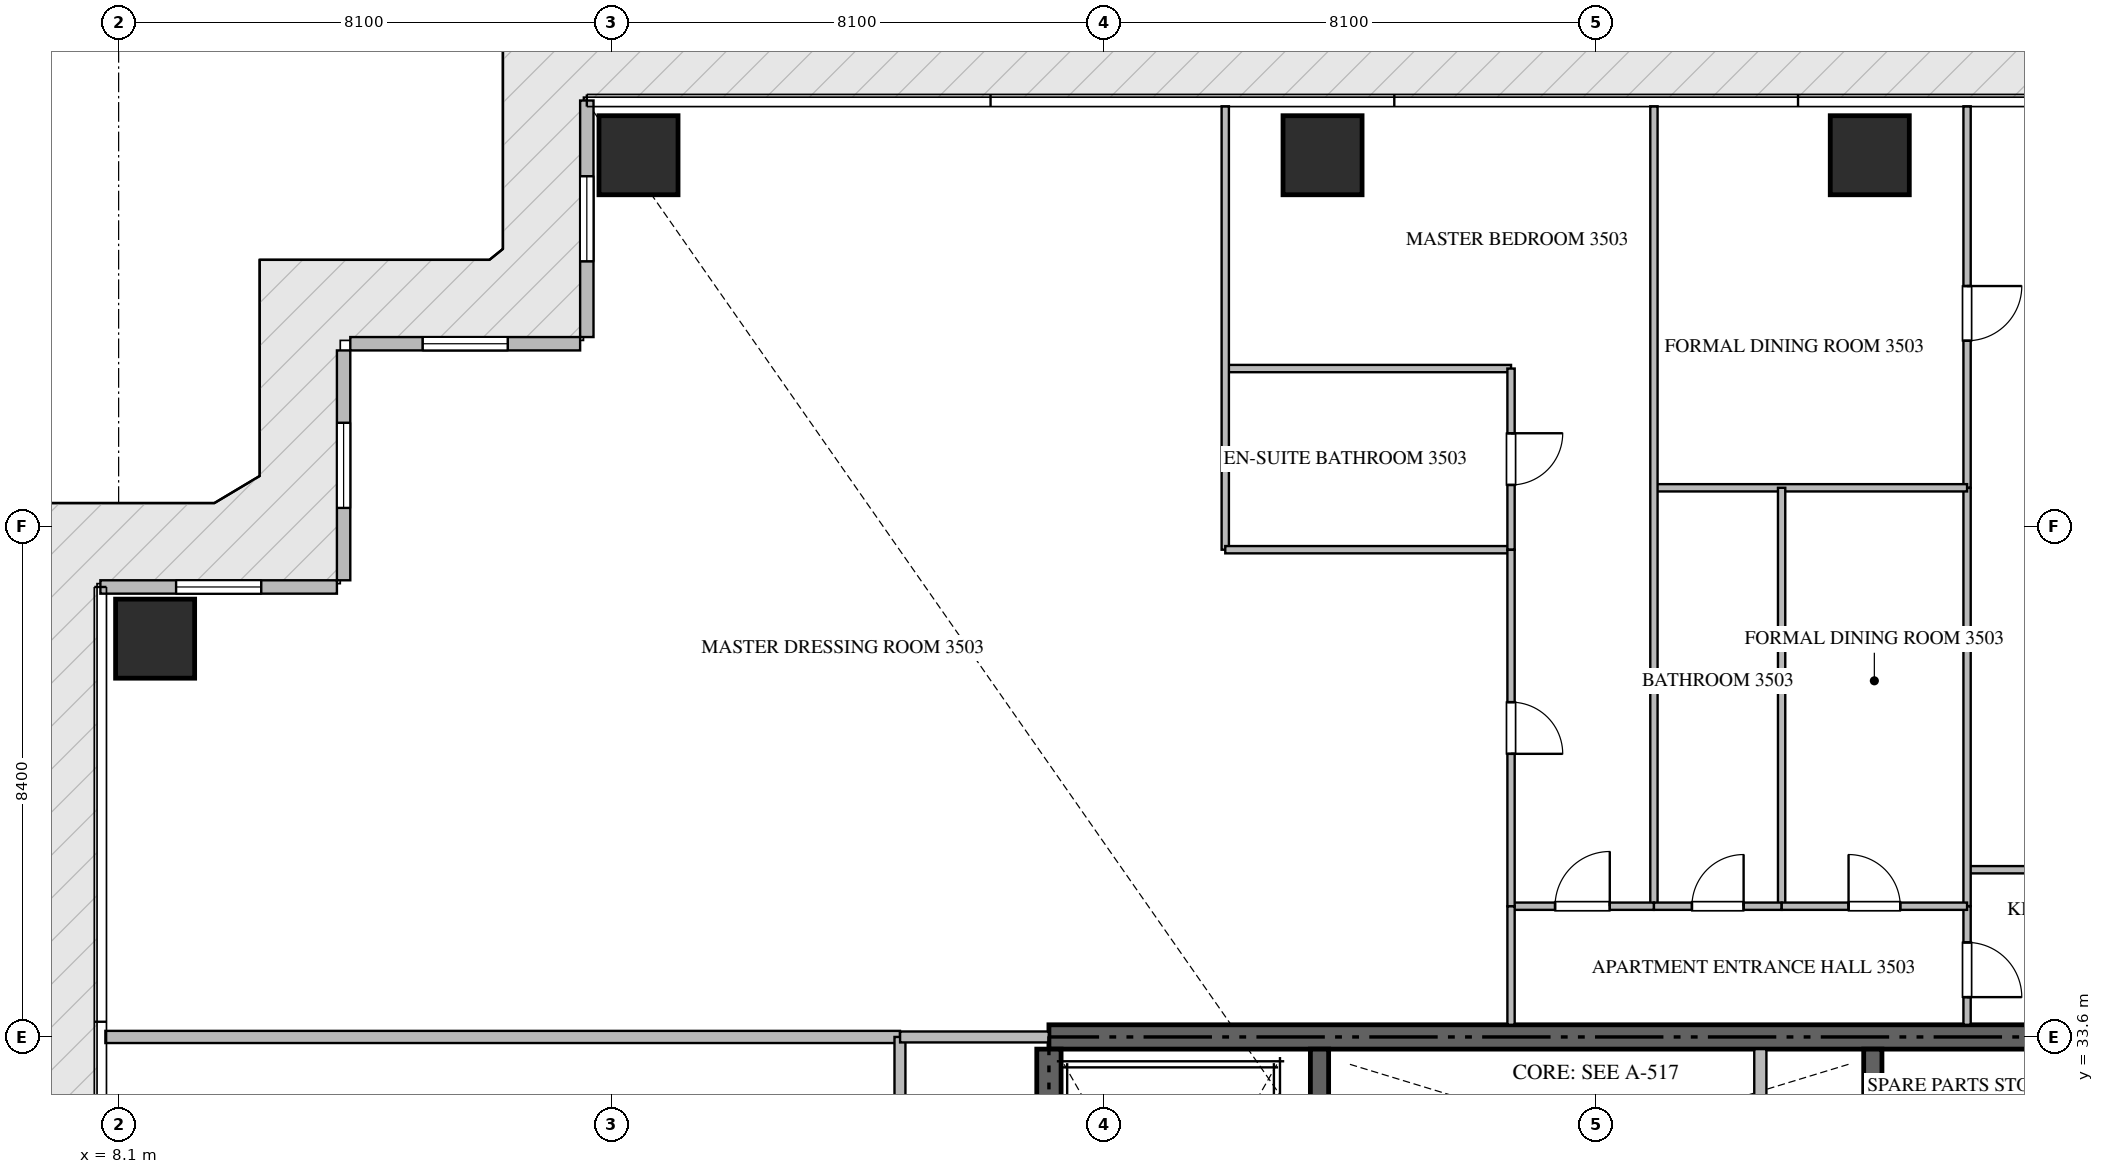
"""IFC4 building model, lengths in metres.
Left out: names, types, materials, properties, quantities, classifications, styles, units other than length and angle.
Written with IfcOpenShell. Run it as: python <this file> out.ifc"""

import sys

from ifc_helpers import new_model, si_unit, direction, frame, frame_2d, origin, origin_2d, place, context, subcontext, project, spatial, rectangle, extrude, source, transform, mapped, element, fill, save


model = new_model("IFC4")
c1 = context("Model", 3, precision=1e-05, world=origin(), true_north=direction((0.0, 1.0)))
c2 = subcontext(c1, "Body", "Model", "MODEL_VIEW")
j1 = project(units=[si_unit("LENGTHUNIT", "METRE"), si_unit("PLANEANGLEUNIT", "RADIAN")], contexts=[c1])
p1 = place(None, origin())
s1 = spatial("IfcSite", under=j1, at=p1, CompositionType="ELEMENT")
p2 = place(p1, origin())
s2 = spatial("IfcBuilding", under=s1, at=p2, CompositionType="ELEMENT")
p3 = place(p2, frame((0.0, 0.0, 142.65)))
s3 = spatial("IfcBuildingStorey", under=s2, at=p3, CompositionType="ELEMENT", Elevation=142.65)
p4 = place(p3, frame((41.4, 33.6, -0.26), z_axis=(0.0, 0.0, 1.0), x_axis=(-1.0, 0.0, 0.0)))
e1 = element("IfcWall", 1, at=p4, inside=s3, PredefinedType="SHEAR", context=c2, shape_type="SweptSolid", body=[
    extrude(rectangle(XDim=18.0, YDim=0.4, at=frame_2d((9.0, 0.0))), origin(), (0.0, 0.0, 1.0), 3.748),
])
p5 = place(p3, frame((23.4, 24.25, -0.26), z_axis=(0.0, 0.0, 1.0), x_axis=(0.0, 1.0, 0.0)))
e2 = element("IfcWall", 2, at=p5, inside=s3, PredefinedType="SHEAR", context=c2, shape_type="SweptSolid", body=[
    extrude(rectangle(XDim=9.15, YDim=0.4, at=frame_2d((4.575, 0.0))), origin(), (0.0, 0.0, 1.0), 3.748),
])
p6 = place(p3, frame((27.85, 23.55, -0.26), z_axis=(0.0, 0.0, 1.0), x_axis=(0.0, 1.0, 0.0)))
e3 = element("IfcWall", 3, at=p6, inside=s3, PredefinedType="SHEAR", context=c2, shape_type="SweptSolid", body=[
    extrude(rectangle(XDim=9.85, YDim=0.3, at=frame_2d((4.925, 0.0))), origin(), (0.0, 0.0, 1.0), 3.748),
])
p7 = place(p3, frame((36.95, 27.05, -0.26), z_axis=(0.0, 0.0, 1.0), x_axis=(0.0, 1.0, 0.0)))
e4 = element("IfcWall", 4, at=p7, inside=s3, PredefinedType="SHEAR", context=c2, shape_type="SweptSolid", body=[
    extrude(rectangle(XDim=6.35, YDim=0.3, at=frame_2d((3.175, 0.0))), origin(), (0.0, 0.0, 1.0), 3.748),
])
m1 = source(origin(), c2, "Body", "SweptSolid", [
    extrude(rectangle(XDim=1.3, YDim=1.3, at=origin_2d()), origin(), (0.0, 0.0, 1.0), 3.75),
])
for number, where, z_axis, x_axis in (
    (5, (16.65, 48.1, -0.26), (0.0, 0.0, 1.0), (1.0, 0.0, 0.0)),
    (6, (27.9, 48.1, -0.26), (0.0, 0.0, 1.0), (1.0, 0.0, 0.0)),
    (7, (36.9, 48.1, -0.26), (0.0, 0.0, 1.0), (1.0, 0.0, 0.0)),
    (8, (8.7, 40.15, -0.26), (0.0, 0.0, 1.0), (1.0, 0.0, 0.0)),
):
    element("IfcColumn", number, at=place(p3, frame(where, z_axis=z_axis, x_axis=x_axis)), inside=s3, PredefinedType="COLUMN", context=c2, shape_type="MappedRepresentation", body=[
        mapped(m1, transform((0.0, 0.0, 0.0), scale=1.0)),
    ])
p8 = place(p3, frame((15.8, 49.0, 0.0), z_axis=(0.0, 0.0, 1.0), x_axis=(0.0, -1.0, 0.0)))
e9 = element("IfcWall", 9, at=p8, inside=s3, PredefinedType="ELEMENTEDWALL", context=c2, shape_type="SweptSolid", body=[
    extrude(rectangle(XDim=3.89, YDim=0.22, at=frame_2d((1.945, 0.0))), origin(), (0.0, 0.0, 1.0), 3.475),
])
p9 = place(p8, frame((1.245, 0.0, 0.65)))
e10 = element("IfcOpeningElement", 10, at=p9, cuts=e9, PredefinedType="OPENING", context=c2, shape_type="SweptSolid", body=[
    extrude(rectangle(XDim=1.4, YDim=2.05, at=frame_2d((0.7, 1.025))), frame((0.0, 0.12, 0.0), z_axis=(0.0, -1.0, 0.0), x_axis=(1.0, 0.0, 0.0)), (0.0, 0.0, 1.0), 0.24),
])
p10 = place(p3, frame((15.69, 45.0, 0.0), z_axis=(0.0, 0.0, 1.0), x_axis=(-1.0, 0.0, 0.0)))
e11 = element("IfcWall", 11, at=p10, inside=s3, PredefinedType="ELEMENTEDWALL", context=c2, shape_type="SweptSolid", body=[
    extrude(rectangle(XDim=3.78, YDim=0.22, at=frame_2d((1.89, 0.0))), origin(), (0.0, 0.0, 1.0), 3.475),
])
p11 = place(p10, frame((1.19, 0.0, 0.65)))
e12 = element("IfcOpeningElement", 12, at=p11, cuts=e11, PredefinedType="OPENING", context=c2, shape_type="SweptSolid", body=[
    extrude(rectangle(XDim=1.4, YDim=2.05, at=frame_2d((0.7, 1.025))), frame((0.0, 0.12, 0.0), z_axis=(0.0, -1.0, 0.0), x_axis=(1.0, 0.0, 0.0)), (0.0, 0.0, 1.0), 0.24),
])
p12 = place(p3, frame((11.8, 44.89, 0.0), z_axis=(0.0, 0.0, 1.0), x_axis=(0.0, -1.0, 0.0)))
e13 = element("IfcWall", 13, at=p12, inside=s3, PredefinedType="ELEMENTEDWALL", context=c2, shape_type="SweptSolid", body=[
    extrude(rectangle(XDim=3.78, YDim=0.22, at=frame_2d((1.89, 0.0))), origin(), (0.0, 0.0, 1.0), 3.475),
])
p13 = place(p12, frame((1.19, 0.0, 0.65)))
e14 = element("IfcOpeningElement", 14, at=p13, cuts=e13, PredefinedType="OPENING", context=c2, shape_type="SweptSolid", body=[
    extrude(rectangle(XDim=1.4, YDim=2.05, at=frame_2d((0.7, 1.025))), frame((0.0, 0.12, 0.0), z_axis=(0.0, -1.0, 0.0), x_axis=(1.0, 0.0, 0.0)), (0.0, 0.0, 1.0), 0.24),
])
p14 = place(p3, frame((11.69, 41.0, 0.0), z_axis=(0.0, 0.0, 1.0), x_axis=(-1.0, 0.0, 0.0)))
e15 = element("IfcWall", 15, at=p14, inside=s3, PredefinedType="ELEMENTEDWALL", context=c2, shape_type="SweptSolid", body=[
    extrude(rectangle(XDim=3.89, YDim=0.22, at=frame_2d((1.945, 0.0))), origin(), (0.0, 0.0, 1.0), 3.475),
])
p15 = place(p14, frame((1.245, 0.0, 0.65)))
e16 = element("IfcOpeningElement", 16, at=p15, cuts=e15, PredefinedType="OPENING", context=c2, shape_type="SweptSolid", body=[
    extrude(rectangle(XDim=1.4, YDim=2.05, at=frame_2d((0.7, 1.025))), frame((0.0, 0.12, 0.0), z_axis=(0.0, -1.0, 0.0), x_axis=(1.0, 0.0, 0.0)), (0.0, 0.0, 1.0), 0.24),
])
p16 = place(p3, frame((35.1, 30.75, 0.0), z_axis=(0.0, 0.0, 1.0), x_axis=(0.0, 1.0, 0.0)))
e17 = element("IfcWall", 17, at=p16, inside=s3, PredefinedType="STANDARD", context=c2, shape_type="SweptSolid", body=[
    extrude(rectangle(XDim=2.65, YDim=0.2, at=frame_2d((1.325, 0.0))), origin(), (0.0, 0.0, 1.0), 3.49),
])
p17 = place(p3, frame((7.882, 33.6, 0.0), z_axis=(0.0, 0.0, 1.0), x_axis=(1.0, 0.0, 0.0)))
e18 = element("IfcWall", 18, at=p17, inside=s3, PredefinedType="PARTITIONING", context=c2, shape_type="SweptSolid", body=[
    extrude(rectangle(XDim=13.068, YDim=0.2, at=frame_2d((6.534, 0.0))), origin(), (0.0, 0.0, 1.0), 3.49),
])
p18 = place(p3, frame((20.95, 14.9, 0.0), z_axis=(0.0, 0.0, 1.0), x_axis=(0.0, 1.0, 0.0)))
e19 = element("IfcWall", 19, at=p18, inside=s3, PredefinedType="PARTITIONING", context=c2, shape_type="SweptSolid", body=[
    extrude(rectangle(XDim=18.7, YDim=0.18, at=frame_2d((9.35, 0.0))), origin(), (0.0, 0.0, 1.0), 3.49),
])
p19 = place(p18, frame((5.328, 0.0, 0.0)))
e20 = element("IfcOpeningElement", 20, at=p19, cuts=e19, PredefinedType="OPENING", context=c2, shape_type="SweptSolid", body=[
    extrude(rectangle(XDim=1.0, YDim=2.15, at=frame_2d((0.5, 1.075))), frame((0.0, 0.1, 0.0), z_axis=(0.0, -1.0, 0.0), x_axis=(1.0, 0.0, 0.0)), (0.0, 0.0, 1.0), 0.2),
])
p20 = place(p18, frame((15.257, 0.0, 0.0)))
e21 = element("IfcOpeningElement", 21, at=p20, cuts=e19, PredefinedType="OPENING", context=c2, shape_type="SweptSolid", body=[
    extrude(rectangle(XDim=1.0, YDim=2.15, at=frame_2d((0.5, 1.075))), frame((0.0, 0.1, 0.0), z_axis=(0.0, -1.0, 0.0), x_axis=(1.0, 0.0, 0.0)), (0.0, 0.0, 1.0), 0.2),
])
p21 = place(p3, frame((20.952, 33.6, 0.0), z_axis=(0.0, 0.0, 1.0), x_axis=(1.0, 0.0, 0.0)))
e22 = element("IfcWall", 22, at=p21, inside=s3, PredefinedType="PARTITIONING", context=c2, shape_type="SweptSolid", body=[
    extrude(rectangle(XDim=2.446, YDim=0.18, at=frame_2d((1.223, 0.0))), origin(), (0.0, 0.0, 1.0), 3.49),
])
p22 = place(p3, frame((38.5, 36.35, 0.0), z_axis=(0.0, 0.0, 1.0), x_axis=(1.0, 0.0, 0.0)))
e23 = element("IfcWall", 23, at=p22, inside=s3, PredefinedType="PARTITIONING", context=c2, shape_type="SweptSolid", body=[
    extrude(rectangle(XDim=2.85, YDim=0.12, at=frame_2d((1.425, 0.0))), origin(), (0.0, 0.0, 1.0), 3.49),
])
p23 = place(p22, frame((1.0, 0.0, 0.0)))
e24 = element("IfcOpeningElement", 24, at=p23, cuts=e23, PredefinedType="OPENING", context=c2, shape_type="SweptSolid", body=[
    extrude(rectangle(XDim=0.85, YDim=2.1, at=frame_2d((0.425, 1.05))), frame((0.0, 0.07, 0.0), z_axis=(0.0, -1.0, 0.0), x_axis=(1.0, 0.0, 0.0)), (0.0, 0.0, 1.0), 0.14),
])
p24 = place(p3, frame((38.5, 35.75, 0.0), z_axis=(0.0, 0.0, 1.0), x_axis=(0.0, -1.0, 0.0)))
e25 = element("IfcWall", 25, at=p24, inside=s3, PredefinedType="PARTITIONING", context=c2, shape_type="SweptSolid", body=[
    extrude(rectangle(XDim=1.95, YDim=0.12, at=frame_2d((0.975, 0.0))), origin(), (0.0, 0.0, 1.0), 3.49),
])
p25 = place(p24, frame((0.595, 0.0, 0.0)))
e26 = element("IfcOpeningElement", 26, at=p25, cuts=e25, PredefinedType="OPENING", context=c2, shape_type="SweptSolid", body=[
    extrude(rectangle(XDim=0.9, YDim=2.1, at=frame_2d((0.45, 1.05))), frame((0.0, 0.07, 0.0), z_axis=(0.0, -1.0, 0.0), x_axis=(1.0, 0.0, 0.0)), (0.0, 0.0, 1.0), 0.14),
])
p26 = place(p3, frame((38.5, 48.905, 0.0), z_axis=(0.0, 0.0, 1.0), x_axis=(0.0, -1.0, 0.0)))
e27 = element("IfcWall", 27, at=p26, inside=s3, PredefinedType="PARTITIONING", context=c2, shape_type="SweptSolid", body=[
    extrude(rectangle(XDim=6.274, YDim=0.12, at=frame_2d((3.137, 0.0))), origin(), (0.0, 0.0, 1.0), 3.49),
])
p27 = place(p26, frame((2.956, 0.0, 0.0)))
e28 = element("IfcOpeningElement", 28, at=p27, cuts=e27, PredefinedType="OPENING", context=c2, shape_type="SweptSolid", body=[
    extrude(rectangle(XDim=0.9, YDim=2.1, at=frame_2d((0.45, 1.05))), frame((0.0, 0.07, 0.0), z_axis=(0.0, -1.0, 0.0), x_axis=(1.0, 0.0, 0.0)), (0.0, 0.0, 1.0), 0.14),
])
p28 = place(p3, frame((38.5, 42.629, 0.0), z_axis=(0.0, 0.0, 1.0), x_axis=(0.0, -1.0, 0.0)))
e29 = element("IfcWall", 29, at=p28, inside=s3, PredefinedType="PARTITIONING", context=c2, shape_type="SweptSolid", body=[
    extrude(rectangle(XDim=6.877, YDim=0.12, at=frame_2d((3.438, 0.0))), origin(), (0.0, 0.0, 1.0), 3.49),
])
p29 = place(p3, frame((33.35, 42.631, 0.0), z_axis=(0.0, 0.0, 1.0), x_axis=(1.0, 0.0, 0.0)))
e30 = element("IfcWall", 30, at=p29, inside=s3, PredefinedType="PARTITIONING", context=c2, shape_type="SweptSolid", body=[
    extrude(rectangle(XDim=5.15, YDim=0.12, at=frame_2d((2.575, 0.0))), origin(), (0.0, 0.0, 1.0), 3.49),
])
p30 = place(p3, frame((33.35, 48.905, 0.0), z_axis=(0.0, 0.0, 1.0), x_axis=(0.0, -1.0, 0.0)))
e31 = element("IfcWall", 31, at=p30, inside=s3, PredefinedType="PARTITIONING", context=c2, shape_type="SweptSolid", body=[
    extrude(rectangle(XDim=13.155, YDim=0.12, at=frame_2d((6.578, 0.0))), origin(), (0.0, 0.0, 1.0), 3.49),
])
p31 = place(p3, frame((35.45, 42.631, 0.0), z_axis=(0.0, 0.0, 1.0), x_axis=(0.0, -1.0, 0.0)))
e32 = element("IfcWall", 32, at=p31, inside=s3, PredefinedType="PARTITIONING", context=c2, shape_type="SweptSolid", body=[
    extrude(rectangle(XDim=6.881, YDim=0.12, at=frame_2d((3.44, 0.0))), origin(), (0.0, 0.0, 1.0), 3.49),
])
p32 = place(p3, frame((33.35, 35.75, 0.0), z_axis=(0.0, 0.0, 1.0), x_axis=(1.0, 0.0, 0.0)))
e33 = element("IfcWall", 33, at=p32, inside=s3, PredefinedType="PARTITIONING", context=c2, shape_type="SweptSolid", body=[
    extrude(rectangle(XDim=2.1, YDim=0.12, at=frame_2d((1.05, 0.0))), origin(), (0.0, 0.0, 1.0), 3.49),
])
p33 = place(p32, frame((0.625, 0.0, 0.0)))
e34 = element("IfcOpeningElement", 34, at=p33, cuts=e33, PredefinedType="OPENING", context=c2, shape_type="SweptSolid", body=[
    extrude(rectangle(XDim=0.85, YDim=2.1, at=frame_2d((0.425, 1.05))), frame((0.0, 0.07, 0.0), z_axis=(0.0, -1.0, 0.0), x_axis=(1.0, 0.0, 0.0)), (0.0, 0.0, 1.0), 0.14),
])
p34 = place(p3, frame((35.452, 35.75, 0.0), z_axis=(0.0, 0.0, 1.0), x_axis=(1.0, 0.0, 0.0)))
e35 = element("IfcWall", 35, at=p34, inside=s3, PredefinedType="PARTITIONING", context=c2, shape_type="SweptSolid", body=[
    extrude(rectangle(XDim=3.048, YDim=0.12, at=frame_2d((1.524, 0.0))), origin(), (0.0, 0.0, 1.0), 3.49),
])
p35 = place(p34, frame((1.099, 0.0, 0.0)))
e36 = element("IfcOpeningElement", 36, at=p35, cuts=e35, PredefinedType="OPENING", context=c2, shape_type="SweptSolid", body=[
    extrude(rectangle(XDim=0.85, YDim=2.1, at=frame_2d((0.425, 1.05))), frame((0.0, 0.07, 0.0), z_axis=(0.0, -1.0, 0.0), x_axis=(1.0, 0.0, 0.0)), (0.0, 0.0, 1.0), 0.14),
])
p36 = place(p3, frame((31.0, 35.75, 0.0), z_axis=(0.0, 0.0, 1.0), x_axis=(1.0, 0.0, 0.0)))
e37 = element("IfcWall", 37, at=p36, inside=s3, PredefinedType="PARTITIONING", context=c2, shape_type="SweptSolid", body=[
    extrude(rectangle(XDim=2.348, YDim=0.12, at=frame_2d((1.174, 0.0))), origin(), (0.0, 0.0, 1.0), 3.49),
])
p37 = place(p36, frame((0.724, 0.0, 0.0)))
e38 = element("IfcOpeningElement", 38, at=p37, cuts=e37, PredefinedType="OPENING", context=c2, shape_type="SweptSolid", body=[
    extrude(rectangle(XDim=0.9, YDim=2.1, at=frame_2d((0.45, 1.05))), frame((0.0, 0.07, 0.0), z_axis=(0.0, -1.0, 0.0), x_axis=(1.0, 0.0, 0.0)), (0.0, 0.0, 1.0), 0.14),
])
p38 = place(p3, frame((26.3, 44.592, 0.0), z_axis=(0.0, 0.0, 1.0), x_axis=(1.0, 0.0, 0.0)))
e39 = element("IfcWall", 39, at=p38, inside=s3, PredefinedType="PARTITIONING", context=c2, shape_type="SweptSolid", body=[
    extrude(rectangle(XDim=4.7, YDim=0.12, at=frame_2d((2.35, 0.0))), origin(), (0.0, 0.0, 1.0), 3.49),
])
p39 = place(p3, frame((26.3, 48.905, 0.0), z_axis=(0.0, 0.0, 1.0), x_axis=(0.0, -1.0, 0.0)))
e40 = element("IfcWall", 40, at=p39, inside=s3, PredefinedType="PARTITIONING", context=c2, shape_type="SweptSolid", body=[
    extrude(rectangle(XDim=7.292, YDim=0.12, at=frame_2d((3.646, 0.0))), origin(), (0.0, 0.0, 1.0), 3.49),
])
p40 = place(p3, frame((26.3, 41.613, 0.0), z_axis=(0.0, 0.0, 1.0), x_axis=(1.0, 0.0, 0.0)))
e41 = element("IfcWall", 41, at=p40, inside=s3, PredefinedType="PARTITIONING", context=c2, shape_type="SweptSolid", body=[
    extrude(rectangle(XDim=4.7, YDim=0.12, at=frame_2d((2.35, 0.0))), origin(), (0.0, 0.0, 1.0), 3.49),
])
p41 = place(p3, frame((31.0, 44.592, 0.0), z_axis=(0.0, 0.0, 1.0), x_axis=(0.0, -1.0, 0.0)))
e42 = element("IfcWall", 42, at=p41, inside=s3, PredefinedType="PARTITIONING", context=c2, shape_type="SweptSolid", body=[
    extrude(rectangle(XDim=2.979, YDim=0.12, at=frame_2d((1.49, 0.0))), origin(), (0.0, 0.0, 1.0), 3.49),
])
p42 = place(p41, frame((1.064, 0.0, 0.0)))
e43 = element("IfcOpeningElement", 43, at=p42, cuts=e42, PredefinedType="OPENING", context=c2, shape_type="SweptSolid", body=[
    extrude(rectangle(XDim=0.85, YDim=2.1, at=frame_2d((0.425, 1.05))), frame((0.0, 0.07, 0.0), z_axis=(0.0, -1.0, 0.0), x_axis=(1.0, 0.0, 0.0)), (0.0, 0.0, 1.0), 0.14),
])
p43 = place(p3, frame((31.0, 41.611, 0.0), z_axis=(0.0, 0.0, 1.0), x_axis=(0.0, -1.0, 0.0)))
e44 = element("IfcWall", 44, at=p43, inside=s3, PredefinedType="PARTITIONING", context=c2, shape_type="SweptSolid", body=[
    extrude(rectangle(XDim=5.861, YDim=0.12, at=frame_2d((2.931, 0.0))), origin(), (0.0, 0.0, 1.0), 3.49),
])
p44 = place(p43, frame((2.505, 0.0, 0.0)))
e45 = element("IfcOpeningElement", 45, at=p44, cuts=e44, PredefinedType="OPENING", context=c2, shape_type="SweptSolid", body=[
    extrude(rectangle(XDim=0.85, YDim=2.1, at=frame_2d((0.425, 1.05))), frame((0.0, 0.07, 0.0), z_axis=(0.0, -1.0, 0.0), x_axis=(1.0, 0.0, 0.0)), (0.0, 0.0, 1.0), 0.14),
])
p45 = place(p3, frame((31.0, 35.748, 0.0), z_axis=(0.0, 0.0, 1.0), x_axis=(0.0, -1.0, 0.0)))
e46 = element("IfcWall", 46, at=p45, inside=s3, PredefinedType="PARTITIONING", context=c2, shape_type="SweptSolid", body=[
    extrude(rectangle(XDim=1.948, YDim=0.12, at=frame_2d((0.974, 0.0))), origin(), (0.0, 0.0, 1.0), 3.49),
])
m2 = source(origin(), c2, "Body", "SweptSolid", [
    extrude(rectangle(XDim=1.4, YDim=2.05, at=frame_2d((0.7, 1.025))), frame((0.0, 0.03, 0.0), z_axis=(0.0, -1.0, 0.0), x_axis=(1.0, 0.0, 0.0)), (0.0, 0.0, 1.0), 0.06),
])
p46 = place(p9, origin())
e47 = element("IfcWindow", 47, at=p46, inside=s3, PartitioningType="SINGLE_PANEL", PredefinedType="WINDOW", context=c2, shape_type="MappedRepresentation", body=[
    mapped(m2, transform((0.0, 0.0, 0.0), scale=1.0)),
])
fill(e10, e47)
p47 = place(p11, origin())
e48 = element("IfcWindow", 48, at=p47, inside=s3, PartitioningType="SINGLE_PANEL", PredefinedType="WINDOW", context=c2, shape_type="MappedRepresentation", body=[
    mapped(m2, transform((0.0, 0.0, 0.0), scale=1.0)),
])
fill(e12, e48)
p48 = place(p13, origin())
e49 = element("IfcWindow", 49, at=p48, inside=s3, PartitioningType="SINGLE_PANEL", PredefinedType="WINDOW", context=c2, shape_type="MappedRepresentation", body=[
    mapped(m2, transform((0.0, 0.0, 0.0), scale=1.0)),
])
fill(e14, e49)
p49 = place(p15, origin())
e50 = element("IfcWindow", 50, at=p49, inside=s3, PartitioningType="SINGLE_PANEL", PredefinedType="WINDOW", context=c2, shape_type="MappedRepresentation", body=[
    mapped(m2, transform((0.0, 0.0, 0.0), scale=1.0)),
])
fill(e16, e50)
m3 = source(origin(), c2, "Body", "SweptSolid", [
    extrude(rectangle(XDim=0.9, YDim=2.1, at=frame_2d((0.45, 1.05))), frame((0.0, 0.025, 0.0), z_axis=(0.0, -1.0, 0.0), x_axis=(1.0, 0.0, 0.0)), (0.0, 0.0, 1.0), 0.05),
])
p50 = place(p25, origin())
e51 = element("IfcDoor", 51, at=p50, inside=s3, OperationType="SINGLE_SWING_RIGHT", PredefinedType="DOOR", context=c2, shape_type="MappedRepresentation", body=[
    mapped(m3, transform((0.0, 0.0, 0.0), scale=1.0)),
])
fill(e26, e51)
p51 = place(p27, origin())
e52 = element("IfcDoor", 52, at=p51, inside=s3, OperationType="SINGLE_SWING_LEFT", PredefinedType="DOOR", context=c2, shape_type="MappedRepresentation", body=[
    mapped(m3, transform((0.0, 0.0, 0.0), scale=1.0)),
])
fill(e28, e52)
m4 = source(origin(), c2, "Body", "SweptSolid", [
    extrude(rectangle(XDim=0.85, YDim=2.1, at=frame_2d((0.425, 1.05))), frame((0.0, 0.025, 0.0), z_axis=(0.0, -1.0, 0.0), x_axis=(1.0, 0.0, 0.0)), (0.0, 0.0, 1.0), 0.05),
])
p52 = place(p33, origin())
e53 = element("IfcDoor", 53, at=p52, inside=s3, OperationType="SINGLE_SWING_RIGHT", PredefinedType="DOOR", context=c2, shape_type="MappedRepresentation", body=[
    mapped(m4, transform((0.0, 0.0, 0.0), scale=1.0)),
])
fill(e34, e53)
p53 = place(p35, origin())
e54 = element("IfcDoor", 54, at=p53, inside=s3, OperationType="SINGLE_SWING_LEFT", PredefinedType="DOOR", context=c2, shape_type="MappedRepresentation", body=[
    mapped(m4, transform((0.0, 0.0, 0.0), scale=1.0)),
])
fill(e36, e54)
p54 = place(p37, origin())
e55 = element("IfcDoor", 55, at=p54, inside=s3, OperationType="SINGLE_SWING_RIGHT", PredefinedType="DOOR", context=c2, shape_type="MappedRepresentation", body=[
    mapped(m3, transform((0.0, 0.0, 0.0), scale=1.0)),
])
fill(e38, e55)
p55 = place(p42, origin())
e56 = element("IfcDoor", 56, at=p55, inside=s3, OperationType="SINGLE_SWING_LEFT", PredefinedType="DOOR", context=c2, shape_type="MappedRepresentation", body=[
    mapped(m4, transform((0.0, 0.0, 0.0), scale=1.0)),
])
fill(e43, e56)
p56 = place(p44, origin())
e57 = element("IfcDoor", 57, at=p56, inside=s3, OperationType="SINGLE_SWING_RIGHT", PredefinedType="DOOR", context=c2, shape_type="MappedRepresentation", body=[
    mapped(m4, transform((0.0, 0.0, 0.0), scale=1.0)),
])
fill(e45, e57)
save(model, sys.argv[1])
